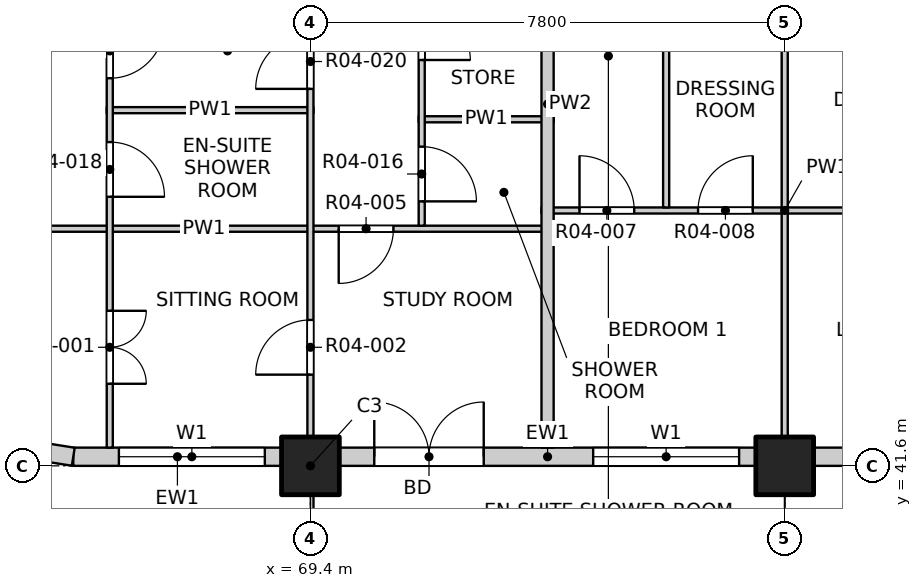
"""IFC4 building model, lengths in metres.
Left out: names, types, materials, properties, quantities, classifications, styles, units other than length and angle.
Written with IfcOpenShell. Run it as: python <this file> out.ifc"""

import sys

from ifc_helpers import new_model, si_unit, direction, frame, frame_2d, origin, origin_2d, place, context, subcontext, project, spatial, rectangle, extrude, element, fill, save


model = new_model("IFC4")
c1 = context("Model", 3, precision=1e-05, world=origin(), true_north=direction((0.0, 1.0)))
c2 = subcontext(c1, "Body", "Model", "MODEL_VIEW")
j1 = project(units=[si_unit("LENGTHUNIT", "METRE"), si_unit("PLANEANGLEUNIT", "RADIAN")], contexts=[c1])
p1 = place(None, origin())
s1 = spatial("IfcSite", under=j1, at=p1, CompositionType="ELEMENT")
p2 = place(p1, origin())
s2 = spatial("IfcBuilding", under=s1, at=p2, CompositionType="ELEMENT")
p3 = place(p2, frame((0.0, 0.0, 58.0)))
s3 = spatial("IfcBuildingStorey", under=s2, at=p3, CompositionType="ELEMENT", Elevation=58.0)
for number, where, z_axis, x_axis in (
    (1, (69.4, 41.6, -0.25), (0.0, 0.0, 1.0), (1.0, 0.0, 0.0)),
    (2, (77.2, 41.6, -0.25), (0.0, 0.0, 1.0), (1.0, 0.0, 0.0)),
):
    element("IfcColumn", number, at=place(p3, frame(where, z_axis=z_axis, x_axis=x_axis)), inside=s3, PredefinedType="COLUMN", context=c2, shape_type="SweptSolid", body=[
        extrude(rectangle(XDim=0.95, YDim=0.95, at=origin_2d()), origin(), (0.0, 0.0, 1.0), 3.4),
    ])
p4 = place(p3, frame((65.5, 41.75, 0.0), z_axis=(0.0, 0.0, 1.0), x_axis=(1.0, 0.0, 0.0)))
e3 = element("IfcWall", 3, at=p4, inside=s3, PredefinedType="SOLIDWALL", context=c2, shape_type="SweptSolid", body=[
    extrude(rectangle(XDim=3.425, YDim=0.3, at=frame_2d((1.712, 0.0))), origin(), (0.0, 0.0, 1.0), 2.7),
])
p5 = place(p4, frame((0.75, 0.0, 0.9)))
e4 = element("IfcOpeningElement", 4, at=p5, cuts=e3, PredefinedType="OPENING", context=c2, shape_type="SweptSolid", body=[
    extrude(rectangle(XDim=2.4, YDim=1.8, at=frame_2d((1.2, 0.9))), frame((0.0, 0.16, 0.0), z_axis=(0.0, -1.0, 0.0), x_axis=(1.0, 0.0, 0.0)), (0.0, 0.0, 1.0), 0.32),
])
p6 = place(p3, frame((69.875, 41.75, 0.0), z_axis=(0.0, 0.0, 1.0), x_axis=(1.0, 0.0, 0.0)))
e5 = element("IfcWall", 5, at=p6, inside=s3, PredefinedType="SOLIDWALL", context=c2, shape_type="SweptSolid", body=[
    extrude(rectangle(XDim=6.85, YDim=0.3, at=frame_2d((3.425, 0.0))), origin(), (0.0, 0.0, 1.0), 2.7),
])
p7 = place(p6, frame((0.575, 0.0, 0.0)))
e6 = element("IfcOpeningElement", 6, at=p7, cuts=e5, PredefinedType="OPENING", context=c2, shape_type="SweptSolid", body=[
    extrude(rectangle(XDim=1.8, YDim=2.4, at=frame_2d((0.9, 1.2))), frame((0.0, 0.16, 0.0), z_axis=(0.0, -1.0, 0.0), x_axis=(1.0, 0.0, 0.0)), (0.0, 0.0, 1.0), 0.32),
])
p8 = place(p6, frame((4.175, 0.0, 0.9)))
e7 = element("IfcOpeningElement", 7, at=p8, cuts=e5, PredefinedType="OPENING", context=c2, shape_type="SweptSolid", body=[
    extrude(rectangle(XDim=2.4, YDim=1.8, at=frame_2d((1.2, 0.9))), frame((0.0, 0.16, 0.0), z_axis=(0.0, -1.0, 0.0), x_axis=(1.0, 0.0, 0.0)), (0.0, 0.0, 1.0), 0.32),
])
p9 = place(p3, frame((77.675, 41.75, 0.0), z_axis=(0.0, 0.0, 1.0), x_axis=(1.0, 0.0, 0.0)))
e8 = element("IfcWall", 8, at=p9, inside=s3, PredefinedType="SOLIDWALL", context=c2, shape_type="SweptSolid", body=[
    extrude(rectangle(XDim=6.85, YDim=0.3, at=frame_2d((3.425, 0.0))), origin(), (0.0, 0.0, 1.0), 2.7),
])
p10 = place(p9, frame((0.575, 0.0, 0.0)))
e9 = element("IfcOpeningElement", 9, at=p10, cuts=e8, PredefinedType="OPENING", context=c2, shape_type="SweptSolid", body=[
    extrude(rectangle(XDim=1.8, YDim=2.4, at=frame_2d((0.9, 1.2))), frame((0.0, 0.16, 0.0), z_axis=(0.0, -1.0, 0.0), x_axis=(1.0, 0.0, 0.0)), (0.0, 0.0, 1.0), 0.32),
])
p11 = place(p9, frame((4.175, 0.0, 0.9)))
e10 = element("IfcOpeningElement", 10, at=p11, cuts=e8, PredefinedType="OPENING", context=c2, shape_type="SweptSolid", body=[
    extrude(rectangle(XDim=2.4, YDim=1.8, at=frame_2d((1.2, 0.9))), frame((0.0, 0.16, 0.0), z_axis=(0.0, -1.0, 0.0), x_axis=(1.0, 0.0, 0.0)), (0.0, 0.0, 1.0), 0.32),
])
p12 = place(p3, frame((64.341, 41.934, 0.0), z_axis=(0.0, 0.0, 1.0), x_axis=(0.987678452879, -0.156496880861, 0.0)))
e11 = element("IfcWall", 11, at=p12, inside=s3, PredefinedType="SOLIDWALL", context=c2, shape_type="SweptSolid", body=[
    extrude(rectangle(XDim=1.173, YDim=0.3, at=frame_2d((0.586, 0.0))), origin(), (0.0, 0.0, 1.0), 2.7),
])
p13 = place(p3, frame((61.9, 45.5, 0.0), z_axis=(0.0, 0.0, 1.0), x_axis=(1.0, 0.0, 0.0)))
e12 = element("IfcWall", 12, at=p13, inside=s3, PredefinedType="PARTITIONING", context=c2, shape_type="SweptSolid", body=[
    extrude(rectangle(XDim=11.5, YDim=0.1, at=frame_2d((5.75, 0.0))), origin(), (0.0, 0.0, 1.0), 3.15),
])
p14 = place(p13, frame((7.965, 0.0, 0.0)))
e13 = element("IfcOpeningElement", 13, at=p14, cuts=e12, PredefinedType="OPENING", context=c2, shape_type="SweptSolid", body=[
    extrude(rectangle(XDim=0.9, YDim=2.1, at=frame_2d((0.45, 1.05))), frame((0.0, 0.06, 0.0), z_axis=(0.0, -1.0, 0.0), x_axis=(1.0, 0.0, 0.0)), (0.0, 0.0, 1.0), 0.12),
])
p15 = place(p3, frame((73.2, 45.8, 0.0), z_axis=(0.0, 0.0, 1.0), x_axis=(1.0, 0.0, 0.0)))
e14 = element("IfcWall", 14, at=p15, inside=s3, PredefinedType="PARTITIONING", context=c2, shape_type="SweptSolid", body=[
    extrude(rectangle(XDim=8.0, YDim=0.1, at=frame_2d((4.0, 0.0))), origin(), (0.0, 0.0, 1.0), 3.15),
])
p16 = place(p15, frame((0.625, 0.0, 0.0)))
e15 = element("IfcOpeningElement", 15, at=p16, cuts=e14, PredefinedType="OPENING", context=c2, shape_type="SweptSolid", body=[
    extrude(rectangle(XDim=0.9, YDim=2.1, at=frame_2d((0.45, 1.05))), frame((0.0, 0.06, 0.0), z_axis=(0.0, -1.0, 0.0), x_axis=(1.0, 0.0, 0.0)), (0.0, 0.0, 1.0), 0.12),
])
p17 = place(p15, frame((2.575, 0.0, 0.0)))
e16 = element("IfcOpeningElement", 16, at=p17, cuts=e14, PredefinedType="OPENING", context=c2, shape_type="SweptSolid", body=[
    extrude(rectangle(XDim=0.9, YDim=2.1, at=frame_2d((0.45, 1.05))), frame((0.0, 0.06, 0.0), z_axis=(0.0, -1.0, 0.0), x_axis=(1.0, 0.0, 0.0)), (0.0, 0.0, 1.0), 0.12),
])
p18 = place(p15, frame((5.35, 0.0, 0.0)))
e17 = element("IfcOpeningElement", 17, at=p18, cuts=e14, PredefinedType="OPENING", context=c2, shape_type="SweptSolid", body=[
    extrude(rectangle(XDim=1.2, YDim=2.1, at=frame_2d((0.6, 1.05))), frame((0.0, 0.06, 0.0), z_axis=(0.0, -1.0, 0.0), x_axis=(1.0, 0.0, 0.0)), (0.0, 0.0, 1.0), 0.12),
])
p19 = place(p3, frame((71.18, 47.3, 0.0), z_axis=(0.0, 0.0, 1.0), x_axis=(1.0, 0.0, 0.0)))
e18 = element("IfcWall", 18, at=p19, inside=s3, PredefinedType="PARTITIONING", context=c2, shape_type="SweptSolid", body=[
    extrude(rectangle(XDim=2.22, YDim=0.1, at=frame_2d((1.11, 0.0))), origin(), (0.0, 0.0, 1.0), 3.15),
])
p20 = place(p3, frame((66.05, 47.45, 0.0), z_axis=(0.0, 0.0, 1.0), x_axis=(1.0, 0.0, 0.0)))
e19 = element("IfcWall", 19, at=p20, inside=s3, PredefinedType="PARTITIONING", context=c2, shape_type="SweptSolid", body=[
    extrude(rectangle(XDim=3.4, YDim=0.1, at=frame_2d((1.7, 0.0))), origin(), (0.0, 0.0, 1.0), 3.15),
])
p21 = place(p3, frame((66.1, 41.9, 0.0), z_axis=(0.0, 0.0, 1.0), x_axis=(0.0, 1.0, 0.0)))
e20 = element("IfcWall", 20, at=p21, inside=s3, PredefinedType="PARTITIONING", context=c2, shape_type="SweptSolid", body=[
    extrude(rectangle(XDim=19.1, YDim=0.1, at=frame_2d((9.55, 0.0))), origin(), (0.0, 0.0, 1.0), 3.15),
])
p22 = place(p21, frame((1.05, 0.0, 0.0)))
e21 = element("IfcOpeningElement", 21, at=p22, cuts=e20, PredefinedType="OPENING", context=c2, shape_type="SweptSolid", body=[
    extrude(rectangle(XDim=1.2, YDim=2.1, at=frame_2d((0.6, 1.05))), frame((0.0, 0.06, 0.0), z_axis=(0.0, -1.0, 0.0), x_axis=(1.0, 0.0, 0.0)), (0.0, 0.0, 1.0), 0.12),
])
p23 = place(p21, frame((4.125, 0.0, 0.0)))
e22 = element("IfcOpeningElement", 22, at=p23, cuts=e20, PredefinedType="OPENING", context=c2, shape_type="SweptSolid", body=[
    extrude(rectangle(XDim=0.9, YDim=2.1, at=frame_2d((0.45, 1.05))), frame((0.0, 0.06, 0.0), z_axis=(0.0, -1.0, 0.0), x_axis=(1.0, 0.0, 0.0)), (0.0, 0.0, 1.0), 0.12),
])
p24 = place(p21, frame((6.075, 0.0, 0.0)))
e23 = element("IfcOpeningElement", 23, at=p24, cuts=e20, PredefinedType="OPENING", context=c2, shape_type="SweptSolid", body=[
    extrude(rectangle(XDim=0.9, YDim=2.1, at=frame_2d((0.45, 1.05))), frame((0.0, 0.06, 0.0), z_axis=(0.0, -1.0, 0.0), x_axis=(1.0, 0.0, 0.0)), (0.0, 0.0, 1.0), 0.12),
])
p25 = place(p21, frame((8.025, 0.0, 0.0)))
e24 = element("IfcOpeningElement", 24, at=p25, cuts=e20, PredefinedType="OPENING", context=c2, shape_type="SweptSolid", body=[
    extrude(rectangle(XDim=0.9, YDim=2.1, at=frame_2d((0.45, 1.05))), frame((0.0, 0.06, 0.0), z_axis=(0.0, -1.0, 0.0), x_axis=(1.0, 0.0, 0.0)), (0.0, 0.0, 1.0), 0.12),
])
p26 = place(p21, frame((9.975, 0.0, 0.0)))
e25 = element("IfcOpeningElement", 25, at=p26, cuts=e20, PredefinedType="OPENING", context=c2, shape_type="SweptSolid", body=[
    extrude(rectangle(XDim=0.9, YDim=2.1, at=frame_2d((0.45, 1.05))), frame((0.0, 0.06, 0.0), z_axis=(0.0, -1.0, 0.0), x_axis=(1.0, 0.0, 0.0)), (0.0, 0.0, 1.0), 0.12),
])
p27 = place(p21, frame((12.75, 0.0, 0.0)))
e26 = element("IfcOpeningElement", 26, at=p27, cuts=e20, PredefinedType="OPENING", context=c2, shape_type="SweptSolid", body=[
    extrude(rectangle(XDim=1.2, YDim=2.1, at=frame_2d((0.6, 1.05))), frame((0.0, 0.06, 0.0), z_axis=(0.0, -1.0, 0.0), x_axis=(1.0, 0.0, 0.0)), (0.0, 0.0, 1.0), 0.12),
])
p28 = place(p21, frame((15.825, 0.0, 0.0)))
e27 = element("IfcOpeningElement", 27, at=p28, cuts=e20, PredefinedType="OPENING", context=c2, shape_type="SweptSolid", body=[
    extrude(rectangle(XDim=0.9, YDim=2.1, at=frame_2d((0.45, 1.05))), frame((0.0, 0.06, 0.0), z_axis=(0.0, -1.0, 0.0), x_axis=(1.0, 0.0, 0.0)), (0.0, 0.0, 1.0), 0.12),
])
p29 = place(p21, frame((17.775, 0.0, 0.0)))
e28 = element("IfcOpeningElement", 28, at=p29, cuts=e20, PredefinedType="OPENING", context=c2, shape_type="SweptSolid", body=[
    extrude(rectangle(XDim=0.9, YDim=2.1, at=frame_2d((0.45, 1.05))), frame((0.0, 0.06, 0.0), z_axis=(0.0, -1.0, 0.0), x_axis=(1.0, 0.0, 0.0)), (0.0, 0.0, 1.0), 0.12),
])
p30 = place(p3, frame((69.4, 41.9, 0.0), z_axis=(0.0, 0.0, 1.0), x_axis=(0.0, 1.0, 0.0)))
e29 = element("IfcWall", 29, at=p30, inside=s3, PredefinedType="PARTITIONING", context=c2, shape_type="SweptSolid", body=[
    extrude(rectangle(XDim=7.5, YDim=0.1, at=frame_2d((3.75, 0.0))), origin(), (0.0, 0.0, 1.0), 2.55),
])
p31 = place(p30, frame((1.2, 0.0, 0.0)))
e30 = element("IfcOpeningElement", 30, at=p31, cuts=e29, PredefinedType="OPENING", context=c2, shape_type="SweptSolid", body=[
    extrude(rectangle(XDim=0.9, YDim=2.1, at=frame_2d((0.45, 1.05))), frame((0.0, 0.06, 0.0), z_axis=(0.0, -1.0, 0.0), x_axis=(1.0, 0.0, 0.0)), (0.0, 0.0, 1.0), 0.12),
])
p32 = place(p30, frame((5.9, 0.0, 0.0)))
e31 = element("IfcOpeningElement", 31, at=p32, cuts=e29, PredefinedType="OPENING", context=c2, shape_type="SweptSolid", body=[
    extrude(rectangle(XDim=0.9, YDim=2.1, at=frame_2d((0.45, 1.05))), frame((0.0, 0.06, 0.0), z_axis=(0.0, -1.0, 0.0), x_axis=(1.0, 0.0, 0.0)), (0.0, 0.0, 1.0), 0.12),
])
p33 = place(p3, frame((71.23, 45.55, 0.0), z_axis=(0.0, 0.0, 1.0), x_axis=(0.0, 1.0, 0.0)))
e32 = element("IfcWall", 32, at=p33, inside=s3, PredefinedType="PARTITIONING", context=c2, shape_type="SweptSolid", body=[
    extrude(rectangle(XDim=9.85, YDim=0.1, at=frame_2d((4.925, 0.0))), origin(), (0.0, 0.0, 1.0), 3.15),
])
p34 = place(p33, frame((0.4, 0.0, 0.0)))
e33 = element("IfcOpeningElement", 33, at=p34, cuts=e32, PredefinedType="OPENING", context=c2, shape_type="SweptSolid", body=[
    extrude(rectangle(XDim=0.9, YDim=2.1, at=frame_2d((0.45, 1.05))), frame((0.0, 0.06, 0.0), z_axis=(0.0, -1.0, 0.0), x_axis=(1.0, 0.0, 0.0)), (0.0, 0.0, 1.0), 0.12),
])
p35 = place(p33, frame((2.725, 0.0, 0.0)))
e34 = element("IfcOpeningElement", 34, at=p35, cuts=e32, PredefinedType="OPENING", context=c2, shape_type="SweptSolid", body=[
    extrude(rectangle(XDim=0.8, YDim=2.1, at=frame_2d((0.4, 1.05))), frame((0.0, 0.06, 0.0), z_axis=(0.0, -1.0, 0.0), x_axis=(1.0, 0.0, 0.0)), (0.0, 0.0, 1.0), 0.12),
])
p36 = place(p33, frame((5.6, 0.0, 0.0)))
e35 = element("IfcOpeningElement", 35, at=p36, cuts=e32, PredefinedType="OPENING", context=c2, shape_type="SweptSolid", body=[
    extrude(rectangle(XDim=0.8, YDim=2.1, at=frame_2d((0.4, 1.05))), frame((0.0, 0.06, 0.0), z_axis=(0.0, -1.0, 0.0), x_axis=(1.0, 0.0, 0.0)), (0.0, 0.0, 1.0), 0.12),
])
p37 = place(p33, frame((8.25, 0.0, 0.0)))
e36 = element("IfcOpeningElement", 36, at=p37, cuts=e32, PredefinedType="OPENING", context=c2, shape_type="SweptSolid", body=[
    extrude(rectangle(XDim=0.9, YDim=2.1, at=frame_2d((0.45, 1.05))), frame((0.0, 0.06, 0.0), z_axis=(0.0, -1.0, 0.0), x_axis=(1.0, 0.0, 0.0)), (0.0, 0.0, 1.0), 0.12),
])
p38 = place(p3, frame((73.3, 41.9, 0.0), z_axis=(0.0, 0.0, 1.0), x_axis=(0.0, 1.0, 0.0)))
e37 = element("IfcWall", 37, at=p38, inside=s3, PredefinedType="PARTITIONING", context=c2, shape_type="SweptSolid", body=[
    extrude(rectangle(XDim=11.3, YDim=0.2, at=frame_2d((5.65, 0.0))), origin(), (0.0, 0.0, 1.0), 3.15),
])
p39 = place(p3, frame((75.25, 45.85, 0.0), z_axis=(0.0, 0.0, 1.0), x_axis=(0.0, 1.0, 0.0)))
e38 = element("IfcWall", 38, at=p39, inside=s3, PredefinedType="PARTITIONING", context=c2, shape_type="SweptSolid", body=[
    extrude(rectangle(XDim=3.5, YDim=0.1, at=frame_2d((1.75, 0.0))), origin(), (0.0, 0.0, 1.0), 3.15),
])
p40 = place(p3, frame((77.2, 41.9, 0.0), z_axis=(0.0, 0.0, 1.0), x_axis=(0.0, 1.0, 0.0)))
e39 = element("IfcWall", 39, at=p40, inside=s3, PredefinedType="PARTITIONING", context=c2, shape_type="SweptSolid", body=[
    extrude(rectangle(XDim=7.45, YDim=0.1, at=frame_2d((3.725, 0.0))), origin(), (0.0, 0.0, 1.0), 2.55),
])
p41 = place(p5, origin())
e40 = element("IfcWindow", 40, at=p41, inside=s3, PartitioningType="DOUBLE_PANEL_VERTICAL", PredefinedType="WINDOW", context=c2, shape_type="SweptSolid", body=[
    extrude(rectangle(XDim=2.4, YDim=1.8, at=frame_2d((1.2, 0.9))), frame((0.0, 0.03, 0.0), z_axis=(0.0, -1.0, 0.0), x_axis=(1.0, 0.0, 0.0)), (0.0, 0.0, 1.0), 0.06),
])
fill(e4, e40)
p42 = place(p7, origin())
e41 = element("IfcDoor", 41, at=p42, inside=s3, OperationType="DOUBLE_DOOR_SINGLE_SWING", PredefinedType="DOOR", context=c2, shape_type="SweptSolid", body=[
    extrude(rectangle(XDim=1.8, YDim=2.4, at=frame_2d((0.9, 1.2))), frame((0.0, 0.025, 0.0), z_axis=(0.0, -1.0, 0.0), x_axis=(1.0, 0.0, 0.0)), (0.0, 0.0, 1.0), 0.05),
])
fill(e6, e41)
p43 = place(p8, origin())
e42 = element("IfcWindow", 42, at=p43, inside=s3, PartitioningType="DOUBLE_PANEL_VERTICAL", PredefinedType="WINDOW", context=c2, shape_type="SweptSolid", body=[
    extrude(rectangle(XDim=2.4, YDim=1.8, at=frame_2d((1.2, 0.9))), frame((0.0, 0.03, 0.0), z_axis=(0.0, -1.0, 0.0), x_axis=(1.0, 0.0, 0.0)), (0.0, 0.0, 1.0), 0.06),
])
fill(e7, e42)
p44 = place(p22, origin())
e43 = element("IfcDoor", 43, at=p44, inside=s3, OperationType="DOUBLE_DOOR_SINGLE_SWING", PredefinedType="DOOR", context=c2, shape_type="SweptSolid", body=[
    extrude(rectangle(XDim=1.2, YDim=2.1, at=frame_2d((0.6, 1.05))), frame((0.0, 0.025, 0.0), z_axis=(0.0, -1.0, 0.0), x_axis=(1.0, 0.0, 0.0)), (0.0, 0.0, 1.0), 0.05),
])
fill(e21, e43)
p45 = place(p31, origin())
e44 = element("IfcDoor", 44, at=p45, inside=s3, OperationType="SINGLE_SWING_LEFT", PredefinedType="DOOR", context=c2, shape_type="SweptSolid", body=[
    extrude(rectangle(XDim=0.9, YDim=2.1, at=frame_2d((0.45, 1.05))), frame((0.0, 0.025, 0.0), z_axis=(0.0, -1.0, 0.0), x_axis=(1.0, 0.0, 0.0)), (0.0, 0.0, 1.0), 0.05),
])
fill(e30, e44)
p46 = place(p14, origin())
e45 = element("IfcDoor", 45, at=p46, inside=s3, OperationType="SINGLE_SWING_RIGHT", PredefinedType="DOOR", context=c2, shape_type="SweptSolid", body=[
    extrude(rectangle(XDim=0.9, YDim=2.1, at=frame_2d((0.45, 1.05))), frame((0.0, 0.025, 0.0), z_axis=(0.0, -1.0, 0.0), x_axis=(1.0, 0.0, 0.0)), (0.0, 0.0, 1.0), 0.05),
])
fill(e13, e45)
p47 = place(p16, origin())
e46 = element("IfcDoor", 46, at=p47, inside=s3, OperationType="SINGLE_SWING_LEFT", PredefinedType="DOOR", context=c2, shape_type="SweptSolid", body=[
    extrude(rectangle(XDim=0.9, YDim=2.1, at=frame_2d((0.45, 1.05))), frame((0.0, 0.025, 0.0), z_axis=(0.0, -1.0, 0.0), x_axis=(1.0, 0.0, 0.0)), (0.0, 0.0, 1.0), 0.05),
])
fill(e15, e46)
p48 = place(p17, origin())
e47 = element("IfcDoor", 47, at=p48, inside=s3, OperationType="SINGLE_SWING_RIGHT", PredefinedType="DOOR", context=c2, shape_type="SweptSolid", body=[
    extrude(rectangle(XDim=0.9, YDim=2.1, at=frame_2d((0.45, 1.05))), frame((0.0, 0.025, 0.0), z_axis=(0.0, -1.0, 0.0), x_axis=(1.0, 0.0, 0.0)), (0.0, 0.0, 1.0), 0.05),
])
fill(e16, e47)
p49 = place(p34, origin())
e48 = element("IfcDoor", 48, at=p49, inside=s3, OperationType="SINGLE_SWING_RIGHT", PredefinedType="DOOR", context=c2, shape_type="SweptSolid", body=[
    extrude(rectangle(XDim=0.9, YDim=2.1, at=frame_2d((0.45, 1.05))), frame((0.0, 0.025, 0.0), z_axis=(0.0, -1.0, 0.0), x_axis=(1.0, 0.0, 0.0)), (0.0, 0.0, 1.0), 0.05),
])
fill(e33, e48)
p50 = place(p23, origin())
e49 = element("IfcDoor", 49, at=p50, inside=s3, OperationType="SINGLE_SWING_RIGHT", PredefinedType="DOOR", context=c2, shape_type="SweptSolid", body=[
    extrude(rectangle(XDim=0.9, YDim=2.1, at=frame_2d((0.45, 1.05))), frame((0.0, 0.025, 0.0), z_axis=(0.0, -1.0, 0.0), x_axis=(1.0, 0.0, 0.0)), (0.0, 0.0, 1.0), 0.05),
])
fill(e22, e49)
p51 = place(p32, origin())
e50 = element("IfcDoor", 50, at=p51, inside=s3, OperationType="SINGLE_SWING_LEFT", PredefinedType="DOOR", context=c2, shape_type="SweptSolid", body=[
    extrude(rectangle(XDim=0.9, YDim=2.1, at=frame_2d((0.45, 1.05))), frame((0.0, 0.025, 0.0), z_axis=(0.0, -1.0, 0.0), x_axis=(1.0, 0.0, 0.0)), (0.0, 0.0, 1.0), 0.05),
])
fill(e31, e50)
p52 = place(p24, origin())
e51 = element("IfcDoor", 51, at=p52, inside=s3, OperationType="SINGLE_SWING_LEFT", PredefinedType="DOOR", context=c2, shape_type="SweptSolid", body=[
    extrude(rectangle(XDim=0.9, YDim=2.1, at=frame_2d((0.45, 1.05))), frame((0.0, 0.025, 0.0), z_axis=(0.0, -1.0, 0.0), x_axis=(1.0, 0.0, 0.0)), (0.0, 0.0, 1.0), 0.05),
])
fill(e23, e51)
p53 = place(p35, origin())
e52 = element("IfcDoor", 52, at=p53, inside=s3, OperationType="SINGLE_SWING_RIGHT", PredefinedType="DOOR", context=c2, shape_type="SweptSolid", body=[
    extrude(rectangle(XDim=0.8, YDim=2.1, at=frame_2d((0.4, 1.05))), frame((0.0, 0.025, 0.0), z_axis=(0.0, -1.0, 0.0), x_axis=(1.0, 0.0, 0.0)), (0.0, 0.0, 1.0), 0.05),
])
fill(e34, e52)
save(model, sys.argv[1])
